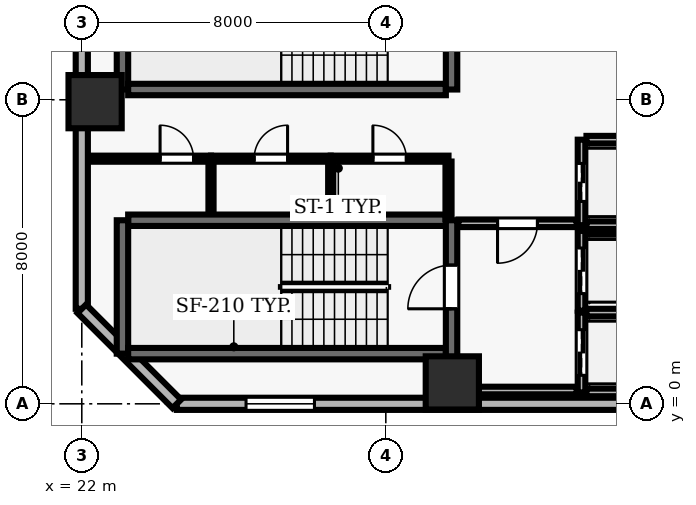
"""IFC4 building model, lengths in metres.
Left out: names, types, materials, properties, quantities, classifications, styles, units other than length and angle.
Written with IfcOpenShell. Run it as: python <this file> out.ifc"""

import sys

from ifc_helpers import new_model, si_unit, direction, frame, frame_2d, origin, origin_2d, place, context, subcontext, project, spatial, rectangle, extrude, element, fill, save


model = new_model("IFC4")
c1 = context("Model", 3, precision=1e-05, world=origin(), true_north=direction((0.0, 1.0)))
c2 = subcontext(c1, "Body", "Model", "MODEL_VIEW")
j1 = project(units=[si_unit("LENGTHUNIT", "METRE"), si_unit("PLANEANGLEUNIT", "RADIAN")], contexts=[c1])
p1 = place(None, origin())
s1 = spatial("IfcSite", under=j1, at=p1, CompositionType="ELEMENT")
p2 = place(p1, origin())
s2 = spatial("IfcBuilding", under=s1, at=p2, CompositionType="ELEMENT")
p3 = place(p2, frame((0.0, 0.0, 89.5)))
s3 = spatial("IfcBuildingStorey", under=s2, at=p3, CompositionType="ELEMENT", Elevation=89.5)
for number, where, z_axis, x_axis in (
    (1, (31.75, 0.55, 0.0), (0.0, 0.0, 1.0), (1.0, 0.0, 0.0)),
    (2, (22.35, 7.95, 0.0), (0.0, 0.0, 1.0), (1.0, 0.0, 0.0)),
):
    element("IfcColumn", number, at=place(p3, frame(where, z_axis=z_axis, x_axis=x_axis)), inside=s3, PredefinedType="COLUMN", context=c2, shape_type="SweptSolid", body=[
        extrude(rectangle(XDim=1.4, YDim=1.4, at=origin_2d()), origin(), (0.0, 0.0, 1.0), 3.9),
    ])
p4 = place(p3, frame((24.5, 0.0, 0.0), z_axis=(0.0, 0.0, 1.0), x_axis=(1.0, 0.0, 0.0)))
e3 = element("IfcWall", 3, at=p4, inside=s3, PredefinedType="SOLIDWALL", context=c2, shape_type="SweptSolid", body=[
    extrude(rectangle(XDim=49.0, YDim=0.32, at=frame_2d((24.5, 0.0))), origin(), (0.0, 0.0, 1.0), 3.64),
])
p5 = place(p4, frame((1.822, 0.0, 0.9)))
e4 = element("IfcOpeningElement", 4, at=p5, cuts=e3, PredefinedType="OPENING", context=c2, shape_type="SweptSolid", body=[
    extrude(rectangle(XDim=1.8, YDim=2.2, at=frame_2d((0.9, 1.1))), frame((0.0, 0.17, 0.0), z_axis=(0.0, -1.0, 0.0), x_axis=(1.0, 0.0, 0.0)), (0.0, 0.0, 1.0), 0.34),
])
p6 = place(p4, frame((18.156, 0.0, 0.9)))
e5 = element("IfcOpeningElement", 5, at=p6, cuts=e3, PredefinedType="OPENING", context=c2, shape_type="SweptSolid", body=[
    extrude(rectangle(XDim=1.8, YDim=2.2, at=frame_2d((0.9, 1.1))), frame((0.0, 0.17, 0.0), z_axis=(0.0, -1.0, 0.0), x_axis=(1.0, 0.0, 0.0)), (0.0, 0.0, 1.0), 0.34),
])
p7 = place(p4, frame((22.7, 0.0, 0.9)))
e6 = element("IfcOpeningElement", 6, at=p7, cuts=e3, PredefinedType="OPENING", context=c2, shape_type="SweptSolid", body=[
    extrude(rectangle(XDim=1.8, YDim=2.2, at=frame_2d((0.9, 1.1))), frame((0.0, 0.17, 0.0), z_axis=(0.0, -1.0, 0.0), x_axis=(1.0, 0.0, 0.0)), (0.0, 0.0, 1.0), 0.34),
])
p8 = place(p4, frame((29.044, 0.0, 0.9)))
e7 = element("IfcOpeningElement", 7, at=p8, cuts=e3, PredefinedType="OPENING", context=c2, shape_type="SweptSolid", body=[
    extrude(rectangle(XDim=1.8, YDim=2.2, at=frame_2d((0.9, 1.1))), frame((0.0, 0.17, 0.0), z_axis=(0.0, -1.0, 0.0), x_axis=(1.0, 0.0, 0.0)), (0.0, 0.0, 1.0), 0.34),
])
p9 = place(p4, frame((35.389, 0.0, 0.9)))
e8 = element("IfcOpeningElement", 8, at=p9, cuts=e3, PredefinedType="OPENING", context=c2, shape_type="SweptSolid", body=[
    extrude(rectangle(XDim=1.8, YDim=2.2, at=frame_2d((0.9, 1.1))), frame((0.0, 0.17, 0.0), z_axis=(0.0, -1.0, 0.0), x_axis=(1.0, 0.0, 0.0)), (0.0, 0.0, 1.0), 0.34),
])
p10 = place(p4, frame((39.933, 0.0, 0.9)))
e9 = element("IfcOpeningElement", 9, at=p10, cuts=e3, PredefinedType="OPENING", context=c2, shape_type="SweptSolid", body=[
    extrude(rectangle(XDim=1.8, YDim=2.2, at=frame_2d((0.9, 1.1))), frame((0.0, 0.17, 0.0), z_axis=(0.0, -1.0, 0.0), x_axis=(1.0, 0.0, 0.0)), (0.0, 0.0, 1.0), 0.34),
])
p11 = place(p4, frame((45.378, 0.0, 0.9)))
e10 = element("IfcOpeningElement", 10, at=p11, cuts=e3, PredefinedType="OPENING", context=c2, shape_type="SweptSolid", body=[
    extrude(rectangle(XDim=1.8, YDim=2.2, at=frame_2d((0.9, 1.1))), frame((0.0, 0.17, 0.0), z_axis=(0.0, -1.0, 0.0), x_axis=(1.0, 0.0, 0.0)), (0.0, 0.0, 1.0), 0.34),
])
p12 = place(p3, frame((22.0, 51.5, 0.0), z_axis=(0.0, 0.0, 1.0), x_axis=(0.0, -1.0, 0.0)))
e11 = element("IfcWall", 11, at=p12, inside=s3, PredefinedType="SOLIDWALL", context=c2, shape_type="SweptSolid", body=[
    extrude(rectangle(XDim=49.0, YDim=0.32, at=frame_2d((24.5, 0.0))), origin(), (0.0, 0.0, 1.0), 3.64),
])
p13 = place(p12, frame((12.1, 0.0, 0.0)))
e12 = element("IfcOpeningElement", 12, at=p13, cuts=e11, PredefinedType="OPENING", context=c2, shape_type="SweptSolid", body=[
    extrude(rectangle(XDim=1.0, YDim=2.2, at=frame_2d((0.5, 1.1))), frame((0.0, 0.17, 0.0), z_axis=(0.0, -1.0, 0.0), x_axis=(1.0, 0.0, 0.0)), (0.0, 0.0, 1.0), 0.34),
])
p14 = place(p12, frame((1.822, 0.0, 0.9)))
e13 = element("IfcOpeningElement", 13, at=p14, cuts=e11, PredefinedType="OPENING", context=c2, shape_type="SweptSolid", body=[
    extrude(rectangle(XDim=1.8, YDim=2.2, at=frame_2d((0.9, 1.1))), frame((0.0, 0.17, 0.0), z_axis=(0.0, -1.0, 0.0), x_axis=(1.0, 0.0, 0.0)), (0.0, 0.0, 1.0), 0.34),
])
p15 = place(p12, frame((7.717, 0.0, 0.9)))
e14 = element("IfcOpeningElement", 14, at=p15, cuts=e11, PredefinedType="OPENING", context=c2, shape_type="SweptSolid", body=[
    extrude(rectangle(XDim=1.8, YDim=2.2, at=frame_2d((0.9, 1.1))), frame((0.0, 0.17, 0.0), z_axis=(0.0, -1.0, 0.0), x_axis=(1.0, 0.0, 0.0)), (0.0, 0.0, 1.0), 0.34),
])
p16 = place(p12, frame((18.156, 0.0, 0.9)))
e15 = element("IfcOpeningElement", 15, at=p16, cuts=e11, PredefinedType="OPENING", context=c2, shape_type="SweptSolid", body=[
    extrude(rectangle(XDim=1.8, YDim=2.2, at=frame_2d((0.9, 1.1))), frame((0.0, 0.17, 0.0), z_axis=(0.0, -1.0, 0.0), x_axis=(1.0, 0.0, 0.0)), (0.0, 0.0, 1.0), 0.34),
])
p17 = place(p12, frame((23.15, 0.0, 0.9)))
e16 = element("IfcOpeningElement", 16, at=p17, cuts=e11, PredefinedType="OPENING", context=c2, shape_type="SweptSolid", body=[
    extrude(rectangle(XDim=1.8, YDim=2.2, at=frame_2d((0.9, 1.1))), frame((0.0, 0.17, 0.0), z_axis=(0.0, -1.0, 0.0), x_axis=(1.0, 0.0, 0.0)), (0.0, 0.0, 1.0), 0.34),
])
p18 = place(p12, frame((29.044, 0.0, 0.9)))
e17 = element("IfcOpeningElement", 17, at=p18, cuts=e11, PredefinedType="OPENING", context=c2, shape_type="SweptSolid", body=[
    extrude(rectangle(XDim=1.8, YDim=2.2, at=frame_2d((0.9, 1.1))), frame((0.0, 0.17, 0.0), z_axis=(0.0, -1.0, 0.0), x_axis=(1.0, 0.0, 0.0)), (0.0, 0.0, 1.0), 0.34),
])
p19 = place(p12, frame((34.039, 0.0, 0.9)))
e18 = element("IfcOpeningElement", 18, at=p19, cuts=e11, PredefinedType="OPENING", context=c2, shape_type="SweptSolid", body=[
    extrude(rectangle(XDim=1.8, YDim=2.2, at=frame_2d((0.9, 1.1))), frame((0.0, 0.17, 0.0), z_axis=(0.0, -1.0, 0.0), x_axis=(1.0, 0.0, 0.0)), (0.0, 0.0, 1.0), 0.34),
])
p20 = place(p12, frame((39.933, 0.0, 0.9)))
e19 = element("IfcOpeningElement", 19, at=p20, cuts=e11, PredefinedType="OPENING", context=c2, shape_type="SweptSolid", body=[
    extrude(rectangle(XDim=1.8, YDim=2.2, at=frame_2d((0.9, 1.1))), frame((0.0, 0.17, 0.0), z_axis=(0.0, -1.0, 0.0), x_axis=(1.0, 0.0, 0.0)), (0.0, 0.0, 1.0), 0.34),
])
p21 = place(p3, frame((22.0, 2.5, 0.0), z_axis=(0.0, 0.0, 1.0), x_axis=(0.707106781187, -0.707106781187, 0.0)))
e20 = element("IfcWall", 20, at=p21, inside=s3, PredefinedType="SOLIDWALL", context=c2, shape_type="SweptSolid", body=[
    extrude(rectangle(XDim=3.536, YDim=0.32, at=frame_2d((1.768, 0.0))), origin(), (0.0, 0.0, 1.0), 3.64),
])
p22 = place(p3, frame((31.58, 4.83, 0.0), z_axis=(0.0, 0.0, 1.0), x_axis=(-1.0, 0.0, 0.0)))
e21 = element("IfcWall", 21, at=p22, inside=s3, PredefinedType="SHEAR", context=c2, shape_type="SweptSolid", body=[
    extrude(rectangle(XDim=8.36, YDim=0.3, at=frame_2d((4.18, 0.0))), origin(), (0.0, 0.0, 1.0), 3.64),
])
p23 = place(p3, frame((23.07, 4.83, 0.0), z_axis=(0.0, 0.0, 1.0), x_axis=(0.0, -1.0, 0.0)))
e22 = element("IfcWall", 22, at=p23, inside=s3, PredefinedType="SHEAR", context=c2, shape_type="SweptSolid", body=[
    extrude(rectangle(XDim=3.51, YDim=0.3, at=frame_2d((1.755, 0.0))), origin(), (0.0, 0.0, 1.0), 3.64),
])
p24 = place(p3, frame((23.22, 1.32, 0.0), z_axis=(0.0, 0.0, 1.0), x_axis=(1.0, 0.0, 0.0)))
e23 = element("IfcWall", 23, at=p24, inside=s3, PredefinedType="SHEAR", context=c2, shape_type="SweptSolid", body=[
    extrude(rectangle(XDim=8.36, YDim=0.3, at=frame_2d((4.18, 0.0))), origin(), (0.0, 0.0, 1.0), 3.64),
])
p25 = place(p3, frame((31.73, 0.96, 0.0), z_axis=(0.0, 0.0, 1.0), x_axis=(0.0, 1.0, 0.0)))
e24 = element("IfcWall", 24, at=p25, inside=s3, PredefinedType="SHEAR", context=c2, shape_type="SweptSolid", body=[
    extrude(rectangle(XDim=3.87, YDim=0.3, at=frame_2d((1.935, 0.0))), origin(), (0.0, 0.0, 1.0), 3.64),
])
p26 = place(p25, frame((1.54, 0.0, 0.0)))
e25 = element("IfcOpeningElement", 25, at=p26, cuts=e24, PredefinedType="OPENING", context=c2, shape_type="SweptSolid", body=[
    extrude(rectangle(XDim=1.15, YDim=2.15, at=frame_2d((0.575, 1.075))), frame((0.0, 0.16, 0.0), z_axis=(0.0, -1.0, 0.0), x_axis=(1.0, 0.0, 0.0)), (0.0, 0.0, 1.0), 0.32),
])
p27 = place(p3, frame((23.07, 11.78, 0.0), z_axis=(0.0, 0.0, 1.0), x_axis=(0.0, -1.0, 0.0)))
e26 = element("IfcWall", 26, at=p27, inside=s3, PredefinedType="SHEAR", context=c2, shape_type="SweptSolid", body=[
    extrude(rectangle(XDim=3.51, YDim=0.3, at=frame_2d((1.755, 0.0))), origin(), (0.0, 0.0, 1.0), 3.64),
])
p28 = place(p3, frame((23.22, 8.27, 0.0), z_axis=(0.0, 0.0, 1.0), x_axis=(1.0, 0.0, 0.0)))
e27 = element("IfcWall", 27, at=p28, inside=s3, PredefinedType="SHEAR", context=c2, shape_type="SweptSolid", body=[
    extrude(rectangle(XDim=8.36, YDim=0.3, at=frame_2d((4.18, 0.0))), origin(), (0.0, 0.0, 1.0), 3.64),
])
p29 = place(p3, frame((31.73, 8.27, 0.0), z_axis=(0.0, 0.0, 1.0), x_axis=(0.0, 1.0, 0.0)))
e28 = element("IfcWall", 28, at=p29, inside=s3, PredefinedType="SHEAR", context=c2, shape_type="SweptSolid", body=[
    extrude(rectangle(XDim=3.51, YDim=0.3, at=frame_2d((1.755, 0.0))), origin(), (0.0, 0.0, 1.0), 3.64),
])
p30 = place(p29, frame((1.18, 0.0, 0.0)))
e29 = element("IfcOpeningElement", 29, at=p30, cuts=e28, PredefinedType="OPENING", context=c2, shape_type="SweptSolid", body=[
    extrude(rectangle(XDim=1.15, YDim=2.15, at=frame_2d((0.575, 1.075))), frame((0.0, 0.16, 0.0), z_axis=(0.0, -1.0, 0.0), x_axis=(1.0, 0.0, 0.0)), (0.0, 0.0, 1.0), 0.32),
])
p31 = place(p3, frame((35.15, 2.4, 0.0), z_axis=(0.0, 0.0, 1.0), x_axis=(0.0, -1.0, 0.0)))
e30 = element("IfcWall", 30, at=p31, inside=s3, PredefinedType="SOLIDWALL", context=c2, shape_type="SweptSolid", body=[
    extrude(rectangle(XDim=2.1, YDim=0.2, at=frame_2d((1.05, 0.0))), origin(), (0.0, 0.0, 1.0), 3.64),
])
p32 = place(p31, frame((0.45, 0.0, 0.0)))
e31 = element("IfcOpeningElement", 31, at=p32, cuts=e30, PredefinedType="OPENING", context=c2, shape_type="SweptSolid", body=[
    extrude(rectangle(XDim=1.2, YDim=2.15, at=frame_2d((0.6, 1.075))), frame((0.0, 0.11, 0.0), z_axis=(0.0, -1.0, 0.0), x_axis=(1.0, 0.0, 0.0)), (0.0, 0.0, 1.0), 0.22),
])
for number, where, z_axis, x_axis in (
    (32, (35.28, 0.3, 0.0), (0.0, 0.0, 1.0), (1.0, 0.0, 0.0)),
    (33, (37.42, 2.4, 0.0), (0.0, 0.0, 1.0), (-1.0, 0.0, 0.0)),
):
    element("IfcWall", number, at=place(p3, frame(where, z_axis=z_axis, x_axis=x_axis)), inside=s3, PredefinedType="SOLIDWALL", context=c2, shape_type="SweptSolid", body=[
        extrude(rectangle(XDim=2.14, YDim=0.2, at=frame_2d((1.07, 0.0))), origin(), (0.0, 0.0, 1.0), 3.64),
    ])
p33 = place(p3, frame((35.15, 4.55, 0.0), z_axis=(0.0, 0.0, 1.0), x_axis=(0.0, -1.0, 0.0)))
e34 = element("IfcWall", 34, at=p33, inside=s3, PredefinedType="SOLIDWALL", context=c2, shape_type="SweptSolid", body=[
    extrude(rectangle(XDim=2.1, YDim=0.2, at=frame_2d((1.05, 0.0))), origin(), (0.0, 0.0, 1.0), 3.64),
])
p34 = place(p33, frame((0.45, 0.0, 0.0)))
e35 = element("IfcOpeningElement", 35, at=p34, cuts=e34, PredefinedType="OPENING", context=c2, shape_type="SweptSolid", body=[
    extrude(rectangle(XDim=1.2, YDim=2.15, at=frame_2d((0.6, 1.075))), frame((0.0, 0.11, 0.0), z_axis=(0.0, -1.0, 0.0), x_axis=(1.0, 0.0, 0.0)), (0.0, 0.0, 1.0), 0.22),
])
p35 = place(p3, frame((37.42, 4.55, 0.0), z_axis=(0.0, 0.0, 1.0), x_axis=(-1.0, 0.0, 0.0)))
e36 = element("IfcWall", 36, at=p35, inside=s3, PredefinedType="SOLIDWALL", context=c2, shape_type="SweptSolid", body=[
    extrude(rectangle(XDim=2.14, YDim=0.2, at=frame_2d((1.07, 0.0))), origin(), (0.0, 0.0, 1.0), 3.64),
])
p36 = place(p3, frame((35.15, 6.95, 0.0), z_axis=(0.0, 0.0, 1.0), x_axis=(0.0, -1.0, 0.0)))
e37 = element("IfcWall", 37, at=p36, inside=s3, PredefinedType="SOLIDWALL", context=c2, shape_type="SweptSolid", body=[
    extrude(rectangle(XDim=2.25, YDim=0.2, at=frame_2d((1.125, 0.0))), origin(), (0.0, 0.0, 1.0), 3.64),
])
p37 = place(p36, frame((0.625, 0.0, 0.0)))
e38 = element("IfcOpeningElement", 38, at=p37, cuts=e37, PredefinedType="OPENING", context=c2, shape_type="SweptSolid", body=[
    extrude(rectangle(XDim=1.0, YDim=2.1, at=frame_2d((0.5, 1.05))), frame((0.0, 0.11, 0.0), z_axis=(0.0, -1.0, 0.0), x_axis=(1.0, 0.0, 0.0)), (0.0, 0.0, 1.0), 0.22),
])
for number, where, z_axis, x_axis in (
    (39, (35.28, 4.7, 0.0), (0.0, 0.0, 1.0), (1.0, 0.0, 0.0)),
    (40, (37.42, 6.95, 0.0), (0.0, 0.0, 1.0), (-1.0, 0.0, 0.0)),
):
    element("IfcWall", number, at=place(p3, frame(where, z_axis=z_axis, x_axis=x_axis)), inside=s3, PredefinedType="SOLIDWALL", context=c2, shape_type="SweptSolid", body=[
        extrude(rectangle(XDim=2.14, YDim=0.2, at=frame_2d((1.07, 0.0))), origin(), (0.0, 0.0, 1.0), 3.64),
    ])
p38 = place(p3, frame((22.2, 6.45, 0.0), z_axis=(0.0, 0.0, 1.0), x_axis=(1.0, 0.0, 0.0)))
e41 = element("IfcWall", 41, at=p38, inside=s3, PredefinedType="PARTITIONING", context=c2, shape_type="SweptSolid", body=[
    extrude(rectangle(XDim=3.2, YDim=0.16, at=frame_2d((1.6, 0.0))), origin(), (0.0, 0.0, 1.0), 3.64),
])
p39 = place(p38, frame((1.86, 0.0, 0.0)))
e42 = element("IfcOpeningElement", 42, at=p39, cuts=e41, PredefinedType="OPENING", context=c2, shape_type="SweptSolid", body=[
    extrude(rectangle(XDim=0.88, YDim=2.1, at=frame_2d((0.44, 1.05))), frame((0.0, 0.09, 0.0), z_axis=(0.0, -1.0, 0.0), x_axis=(1.0, 0.0, 0.0)), (0.0, 0.0, 1.0), 0.18),
])
p40 = place(p3, frame((25.4, 6.45, 0.0), z_axis=(0.0, 0.0, 1.0), x_axis=(1.0, 0.0, 0.0)))
e43 = element("IfcWall", 43, at=p40, inside=s3, PredefinedType="PARTITIONING", context=c2, shape_type="SweptSolid", body=[
    extrude(rectangle(XDim=3.15, YDim=0.16, at=frame_2d((1.575, 0.0))), origin(), (0.0, 0.0, 1.0), 3.64),
])
p41 = place(p40, frame((1.135, 0.0, 0.0)))
e44 = element("IfcOpeningElement", 44, at=p41, cuts=e43, PredefinedType="OPENING", context=c2, shape_type="SweptSolid", body=[
    extrude(rectangle(XDim=0.88, YDim=2.1, at=frame_2d((0.44, 1.05))), frame((0.0, 0.09, 0.0), z_axis=(0.0, -1.0, 0.0), x_axis=(1.0, 0.0, 0.0)), (0.0, 0.0, 1.0), 0.18),
])
p42 = place(p3, frame((28.55, 6.45, 0.0), z_axis=(0.0, 0.0, 1.0), x_axis=(1.0, 0.0, 0.0)))
e45 = element("IfcWall", 45, at=p42, inside=s3, PredefinedType="PARTITIONING", context=c2, shape_type="SweptSolid", body=[
    extrude(rectangle(XDim=3.1, YDim=0.16, at=frame_2d((1.55, 0.0))), origin(), (0.0, 0.0, 1.0), 3.64),
])
p43 = place(p42, frame((1.11, 0.0, 0.0)))
e46 = element("IfcOpeningElement", 46, at=p43, cuts=e45, PredefinedType="OPENING", context=c2, shape_type="SweptSolid", body=[
    extrude(rectangle(XDim=0.88, YDim=2.1, at=frame_2d((0.44, 1.05))), frame((0.0, 0.09, 0.0), z_axis=(0.0, -1.0, 0.0), x_axis=(1.0, 0.0, 0.0)), (0.0, 0.0, 1.0), 0.18),
])
p44 = place(p3, frame((31.65, 0.35, 0.0), z_axis=(0.0, 0.0, 1.0), x_axis=(1.0, 0.0, 0.0)))
e47 = element("IfcWall", 47, at=p44, inside=s3, PredefinedType="SOLIDWALL", context=c2, shape_type="SweptSolid", body=[
    extrude(rectangle(XDim=3.37, YDim=0.2, at=frame_2d((1.685, 0.0))), origin(), (0.0, 0.0, 1.0), 3.64),
])
p45 = place(p3, frame((35.02, 4.75, 0.0), z_axis=(0.0, 0.0, 1.0), x_axis=(-1.0, 0.0, 0.0)))
e48 = element("IfcWall", 48, at=p45, inside=s3, PredefinedType="SOLIDWALL", context=c2, shape_type="SweptSolid", body=[
    extrude(rectangle(XDim=3.11, YDim=0.2, at=frame_2d((1.555, 0.0))), origin(), (0.0, 0.0, 1.0), 3.64),
])
p46 = place(p45, frame((1.03, 0.0, 0.0)))
e49 = element("IfcOpeningElement", 49, at=p46, cuts=e48, PredefinedType="OPENING", context=c2, shape_type="SweptSolid", body=[
    extrude(rectangle(XDim=1.05, YDim=2.15, at=frame_2d((0.525, 1.075))), frame((0.0, 0.11, 0.0), z_axis=(0.0, -1.0, 0.0), x_axis=(1.0, 0.0, 0.0)), (0.0, 0.0, 1.0), 0.22),
])
for number, where, z_axis, x_axis in (
    (50, (25.4, 5.01, 0.0), (0.0, 0.0, 1.0), (0.0, 1.0, 0.0)),
    (51, (28.55, 5.01, 0.0), (0.0, 0.0, 1.0), (0.0, 1.0, 0.0)),
):
    element("IfcWall", number, at=place(p3, frame(where, z_axis=z_axis, x_axis=x_axis)), inside=s3, PredefinedType="PARTITIONING", context=c2, shape_type="SweptSolid", body=[
        extrude(rectangle(XDim=1.365, YDim=0.135, at=frame_2d((0.683, 0.0))), origin(), (0.0, 0.0, 1.0), 3.64),
    ])
p47 = place(p3, frame((31.65, 4.86, 0.0), z_axis=(0.0, 0.0, 1.0), x_axis=(0.0, 1.0, 0.0)))
e52 = element("IfcWall", 52, at=p47, inside=s3, PredefinedType="PARTITIONING", context=c2, shape_type="SweptSolid", body=[
    extrude(rectangle(XDim=1.515, YDim=0.16, at=frame_2d((0.757, 0.0))), origin(), (0.0, 0.0, 1.0), 3.64),
])
p48 = place(p5, origin())
e53 = element("IfcWindow", 53, at=p48, inside=s3, PartitioningType="SINGLE_PANEL", PredefinedType="WINDOW", context=c2, shape_type="SweptSolid", body=[
    extrude(rectangle(XDim=1.8, YDim=2.2, at=frame_2d((0.9, 1.1))), frame((0.0, 0.03, 0.0), z_axis=(0.0, -1.0, 0.0), x_axis=(1.0, 0.0, 0.0)), (0.0, 0.0, 1.0), 0.06),
])
fill(e4, e53)
p49 = place(p26, origin())
e54 = element("IfcDoor", 54, at=p49, inside=s3, OperationType="SINGLE_SWING_LEFT", PredefinedType="DOOR", context=c2, shape_type="SweptSolid", body=[
    extrude(rectangle(XDim=1.15, YDim=2.15, at=frame_2d((0.575, 1.075))), frame((0.0, 0.025, 0.0), z_axis=(0.0, -1.0, 0.0), x_axis=(1.0, 0.0, 0.0)), (0.0, 0.0, 1.0), 0.05),
])
fill(e25, e54)
p50 = place(p32, origin())
e55 = element("IfcDoor", 55, at=p50, inside=s3, OperationType="DOUBLE_DOOR_SLIDING", PredefinedType="DOOR", context=c2, shape_type="SweptSolid", body=[
    extrude(rectangle(XDim=1.2, YDim=2.15, at=frame_2d((0.6, 1.075))), frame((0.0, 0.025, 0.0), z_axis=(0.0, -1.0, 0.0), x_axis=(1.0, 0.0, 0.0)), (0.0, 0.0, 1.0), 0.05),
])
fill(e31, e55)
p51 = place(p34, origin())
e56 = element("IfcDoor", 56, at=p51, inside=s3, OperationType="DOUBLE_DOOR_SLIDING", PredefinedType="DOOR", context=c2, shape_type="SweptSolid", body=[
    extrude(rectangle(XDim=1.2, YDim=2.15, at=frame_2d((0.6, 1.075))), frame((0.0, 0.025, 0.0), z_axis=(0.0, -1.0, 0.0), x_axis=(1.0, 0.0, 0.0)), (0.0, 0.0, 1.0), 0.05),
])
fill(e35, e56)
p52 = place(p37, origin())
e57 = element("IfcDoor", 57, at=p52, inside=s3, OperationType="DOUBLE_DOOR_SLIDING", PredefinedType="DOOR", context=c2, shape_type="SweptSolid", body=[
    extrude(rectangle(XDim=1.0, YDim=2.1, at=frame_2d((0.5, 1.05))), frame((0.0, 0.025, 0.0), z_axis=(0.0, -1.0, 0.0), x_axis=(1.0, 0.0, 0.0)), (0.0, 0.0, 1.0), 0.05),
])
fill(e38, e57)
p53 = place(p46, origin())
e58 = element("IfcDoor", 58, at=p53, inside=s3, OperationType="SINGLE_SWING_RIGHT", PredefinedType="DOOR", context=c2, shape_type="SweptSolid", body=[
    extrude(rectangle(XDim=1.05, YDim=2.15, at=frame_2d((0.525, 1.075))), frame((0.0, 0.025, 0.0), z_axis=(0.0, -1.0, 0.0), x_axis=(1.0, 0.0, 0.0)), (0.0, 0.0, 1.0), 0.05),
])
fill(e49, e58)
p54 = place(p39, origin())
e59 = element("IfcDoor", 59, at=p54, inside=s3, OperationType="SINGLE_SWING_LEFT", PredefinedType="DOOR", context=c2, shape_type="SweptSolid", body=[
    extrude(rectangle(XDim=0.88, YDim=2.1, at=frame_2d((0.44, 1.05))), frame((0.0, 0.025, 0.0), z_axis=(0.0, -1.0, 0.0), x_axis=(1.0, 0.0, 0.0)), (0.0, 0.0, 1.0), 0.05),
])
fill(e42, e59)
p55 = place(p41, origin())
e60 = element("IfcDoor", 60, at=p55, inside=s3, OperationType="SINGLE_SWING_RIGHT", PredefinedType="DOOR", context=c2, shape_type="SweptSolid", body=[
    extrude(rectangle(XDim=0.88, YDim=2.1, at=frame_2d((0.44, 1.05))), frame((0.0, 0.025, 0.0), z_axis=(0.0, -1.0, 0.0), x_axis=(1.0, 0.0, 0.0)), (0.0, 0.0, 1.0), 0.05),
])
fill(e44, e60)
p56 = place(p43, origin())
e61 = element("IfcDoor", 61, at=p56, inside=s3, OperationType="SINGLE_SWING_LEFT", PredefinedType="DOOR", context=c2, shape_type="SweptSolid", body=[
    extrude(rectangle(XDim=0.88, YDim=2.1, at=frame_2d((0.44, 1.05))), frame((0.0, 0.025, 0.0), z_axis=(0.0, -1.0, 0.0), x_axis=(1.0, 0.0, 0.0)), (0.0, 0.0, 1.0), 0.05),
])
fill(e46, e61)
save(model, sys.argv[1])
